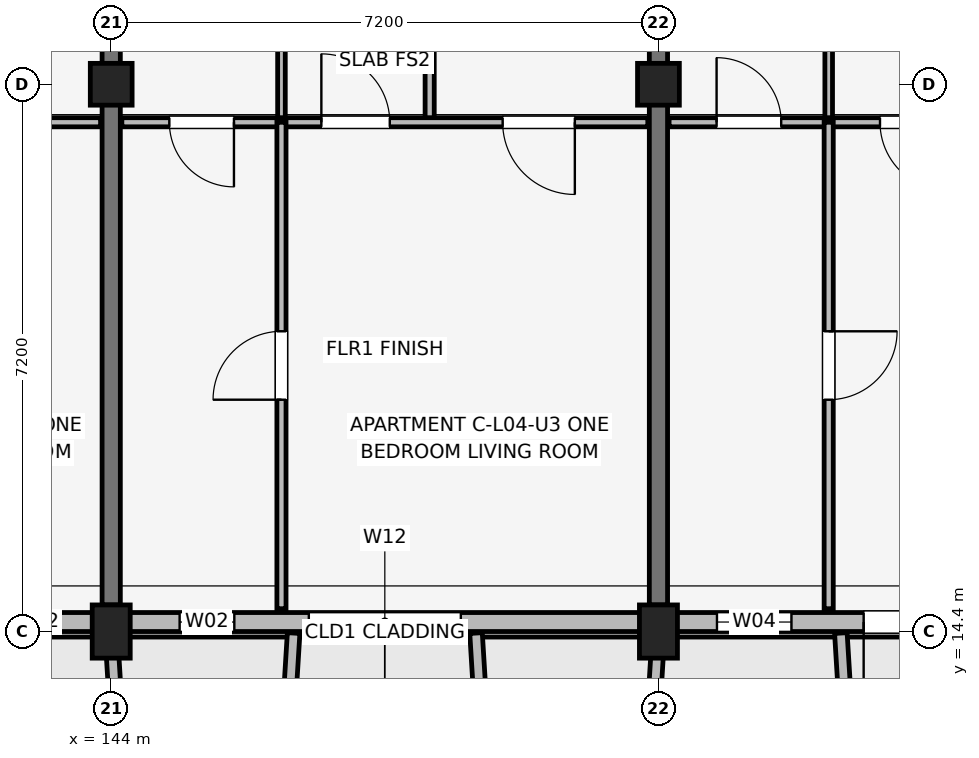
"""IFC4 building model, lengths in metres.
Left out: names, types, materials, properties, quantities, classifications, styles, units other than length and angle.
Written with IfcOpenShell. Run it as: python <this file> out.ifc"""

import sys

from ifc_helpers import new_model, si_unit, direction, frame, frame_2d, origin, origin_2d, place, context, subcontext, project, spatial, rectangle, extrude, element, fill, save


model = new_model("IFC4")
c1 = context("Model", 3, precision=1e-05, world=origin(), true_north=direction((0.0, 1.0)))
c2 = subcontext(c1, "Body", "Model", "MODEL_VIEW")
j1 = project(units=[si_unit("LENGTHUNIT", "METRE"), si_unit("PLANEANGLEUNIT", "RADIAN")], contexts=[c1])
p1 = place(None, origin())
s1 = spatial("IfcSite", under=j1, at=p1, CompositionType="ELEMENT")
p2 = place(p1, origin())
s2 = spatial("IfcBuilding", under=s1, at=p2, CompositionType="ELEMENT")
p3 = place(p2, frame((0.0, 0.0, 15.0)))
s3 = spatial("IfcBuildingStorey", under=s2, at=p3, CompositionType="ELEMENT", Elevation=15.0)
p4 = place(p3, frame((144.0, 14.4, 0.0), z_axis=(0.0, 0.0, 1.0), x_axis=(1.0, 0.0, 0.0)))
e1 = element("IfcColumn", 1, at=p4, inside=s3, PredefinedType="COLUMN", context=c2, shape_type="SweptSolid", body=[
    extrude(rectangle(XDim=0.5, YDim=0.7, at=origin_2d()), origin(), (0.0, 0.0, 1.0), 3.15),
])
p5 = place(p3, frame((144.0, 21.6, 0.0), z_axis=(0.0, 0.0, 1.0), x_axis=(1.0, 0.0, 0.0)))
e2 = element("IfcColumn", 2, at=p5, inside=s3, PredefinedType="COLUMN", context=c2, shape_type="SweptSolid", body=[
    extrude(rectangle(XDim=0.55, YDim=0.55, at=origin_2d()), origin(), (0.0, 0.0, 1.0), 3.15),
])
p6 = place(p3, frame((151.2, 14.4, 0.0), z_axis=(0.0, 0.0, 1.0), x_axis=(1.0, 0.0, 0.0)))
e3 = element("IfcColumn", 3, at=p6, inside=s3, PredefinedType="COLUMN", context=c2, shape_type="SweptSolid", body=[
    extrude(rectangle(XDim=0.5, YDim=0.7, at=origin_2d()), origin(), (0.0, 0.0, 1.0), 3.15),
])
p7 = place(p3, frame((151.2, 21.6, 0.0), z_axis=(0.0, 0.0, 1.0), x_axis=(1.0, 0.0, 0.0)))
e4 = element("IfcColumn", 4, at=p7, inside=s3, PredefinedType="COLUMN", context=c2, shape_type="SweptSolid", body=[
    extrude(rectangle(XDim=0.55, YDim=0.55, at=origin_2d()), origin(), (0.0, 0.0, 1.0), 3.15),
])
for number, where, z_axis, x_axis in (
    (5, (144.0, 14.75, 0.0), (0.0, 0.0, 1.0), (0.0, 1.0, 0.0)),
    (6, (151.2, 14.75, 0.0), (0.0, 0.0, 1.0), (0.0, 1.0, 0.0)),
):
    element("IfcWall", number, at=place(p3, frame(where, z_axis=z_axis, x_axis=x_axis)), inside=s3, PredefinedType="SHEAR", context=c2, shape_type="SweptSolid", body=[
        extrude(rectangle(XDim=9.4, YDim=0.24, at=frame_2d((4.7, 0.0))), origin(), (0.0, 0.0, 1.0), 3.15),
    ])
p8 = place(p3, frame((132.6, 14.525, 0.0), z_axis=(0.0, 0.0, 1.0), x_axis=(1.0, 0.0, 0.0)))
e7 = element("IfcWall", 7, at=p8, inside=s3, PredefinedType="SOLIDWALL", context=c2, shape_type="SweptSolid", body=[
    extrude(rectangle(XDim=30.0, YDim=0.25, at=frame_2d((15.0, 0.0))), origin(), (0.0, 0.0, 1.0), 2.43),
])
p9 = place(p8, frame((8.55, 0.0, 0.0), z_axis=(0.0, 0.0, 1.0), x_axis=(-1.0, 0.0, 0.0)))
e8 = element("IfcOpeningElement", 8, at=p9, cuts=e7, PredefinedType="OPENING", context=c2, shape_type="SweptSolid", body=[
    extrude(rectangle(XDim=1.5, YDim=2.15, at=frame_2d((0.75, 1.075))), frame((0.0, 0.135, 0.0), z_axis=(0.0, -1.0, 0.0), x_axis=(1.0, 0.0, 0.0)), (0.0, 0.0, 1.0), 0.27),
])
p10 = place(p8, frame((23.1, 0.0, 0.0), z_axis=(0.0, 0.0, 1.0), x_axis=(-1.0, 0.0, 0.0)))
e9 = element("IfcOpeningElement", 9, at=p10, cuts=e7, PredefinedType="OPENING", context=c2, shape_type="SweptSolid", body=[
    extrude(rectangle(XDim=1.8, YDim=2.15, at=frame_2d((0.9, 1.075))), frame((0.0, 0.135, 0.0), z_axis=(0.0, -1.0, 0.0), x_axis=(1.0, 0.0, 0.0)), (0.0, 0.0, 1.0), 0.27),
])
p11 = place(p8, frame((2.555, 0.0, 0.75)))
e10 = element("IfcOpeningElement", 10, at=p11, cuts=e7, PredefinedType="OPENING", context=c2, shape_type="SweptSolid", body=[
    extrude(rectangle(XDim=1.22, YDim=1.5, at=frame_2d((0.61, 0.75))), frame((0.0, 0.135, 0.0), z_axis=(0.0, -1.0, 0.0), x_axis=(1.0, 0.0, 0.0)), (0.0, 0.0, 1.0), 0.27),
])
p12 = place(p8, frame((5.035, 0.0, 0.75)))
e11 = element("IfcOpeningElement", 11, at=p12, cuts=e7, PredefinedType="OPENING", context=c2, shape_type="SweptSolid", body=[
    extrude(rectangle(XDim=0.6, YDim=1.25, at=frame_2d((0.3, 0.625))), frame((0.0, 0.135, 0.0), z_axis=(0.0, -1.0, 0.0), x_axis=(1.0, 0.0, 0.0)), (0.0, 0.0, 1.0), 0.27),
])
p13 = place(p8, frame((12.3, 0.0, 0.75)))
e12 = element("IfcOpeningElement", 12, at=p13, cuts=e7, PredefinedType="OPENING", context=c2, shape_type="SweptSolid", body=[
    extrude(rectangle(XDim=0.72, YDim=1.35, at=frame_2d((0.36, 0.675))), frame((0.0, 0.135, 0.0), z_axis=(0.0, -1.0, 0.0), x_axis=(1.0, 0.0, 0.0)), (0.0, 0.0, 1.0), 0.27),
])
p14 = place(p8, frame((14.0, 0.0, 0.67)))
e13 = element("IfcOpeningElement", 13, at=p14, cuts=e7, PredefinedType="OPENING", context=c2, shape_type="SweptSolid", body=[
    extrude(rectangle(XDim=2.0, YDim=1.65, at=frame_2d((1.0, 0.825))), frame((0.0, 0.135, 0.0), z_axis=(0.0, -1.0, 0.0), x_axis=(1.0, 0.0, 0.0)), (0.0, 0.0, 1.0), 0.27),
])
p15 = place(p8, frame((19.37, 0.0, 0.75)))
e14 = element("IfcOpeningElement", 14, at=p15, cuts=e7, PredefinedType="OPENING", context=c2, shape_type="SweptSolid", body=[
    extrude(rectangle(XDim=0.98, YDim=1.45, at=frame_2d((0.49, 0.725))), frame((0.0, 0.135, 0.0), z_axis=(0.0, -1.0, 0.0), x_axis=(1.0, 0.0, 0.0)), (0.0, 0.0, 1.0), 0.27),
])
p16 = place(p8, frame((26.215, 0.0, 0.7)))
e15 = element("IfcOpeningElement", 15, at=p16, cuts=e7, PredefinedType="OPENING", context=c2, shape_type="SweptSolid", body=[
    extrude(rectangle(XDim=1.86, YDim=1.6, at=frame_2d((0.93, 0.8))), frame((0.0, 0.135, 0.0), z_axis=(0.0, -1.0, 0.0), x_axis=(1.0, 0.0, 0.0)), (0.0, 0.0, 1.0), 0.27),
])
p17 = place(p3, frame((144.0, 14.38, 0.0), z_axis=(0.0, 0.0, 1.0), x_axis=(0.061170732449, -0.998127317276, 0.0)))
e16 = element("IfcWall", 16, at=p17, inside=s3, PredefinedType="ELEMENTEDWALL", context=c2, shape_type="SweptSolid", body=[
    extrude(rectangle(XDim=1.964, YDim=0.165, at=frame_2d((0.982, 0.0))), origin(), (0.0, 0.0, 1.0), 2.95),
])
for number, where, z_axis, x_axis in (
    (17, (146.4, 14.38, 0.0), (0.0, 0.0, 1.0), (-0.061, -0.998, 0.0)),
    (18, (148.8, 14.38, 0.0), (0.0, 0.0, 1.0), (0.061, -0.998, 0.0)),
):
    element("IfcWall", number, at=place(p3, frame(where, z_axis=z_axis, x_axis=x_axis)), inside=s3, PredefinedType="ELEMENTEDWALL", context=c2, shape_type="SweptSolid", body=[
        extrude(rectangle(XDim=1.964, YDim=0.165, at=frame_2d((0.982, 0.0))), origin(), (0.0, 0.0, 1.0), 2.58),
    ])
p18 = place(p3, frame((151.2, 14.38, 0.0), z_axis=(0.0, 0.0, 1.0), x_axis=(-0.061046865508, -0.998134900808, 0.0)))
e19 = element("IfcWall", 19, at=p18, inside=s3, PredefinedType="ELEMENTEDWALL", context=c2, shape_type="SweptSolid", body=[
    extrude(rectangle(XDim=1.964, YDim=0.165, at=frame_2d((0.982, 0.0))), origin(), (0.0, 0.0, 1.0), 2.95),
])
p19 = place(p3, frame((153.6, 14.38, 0.0), z_axis=(0.0, 0.0, 1.0), x_axis=(0.061046865508, -0.998134900808, 0.0)))
e20 = element("IfcWall", 20, at=p19, inside=s3, PredefinedType="ELEMENTEDWALL", context=c2, shape_type="SweptSolid", body=[
    extrude(rectangle(XDim=1.964, YDim=0.165, at=frame_2d((0.982, 0.0))), origin(), (0.0, 0.0, 1.0), 2.45),
])
p20 = place(p3, frame((136.94, 21.1, 0.0), z_axis=(0.0, 0.0, 1.0), x_axis=(1.0, 0.0, 0.0)))
e21 = element("IfcWall", 21, at=p20, inside=s3, PredefinedType="PARTITIONING", context=c2, shape_type="SweptSolid", body=[
    extrude(rectangle(XDim=6.92, YDim=0.12, at=frame_2d((3.46, 0.0))), origin(), (0.0, 0.0, 1.0), 2.38),
])
p21 = place(p20, frame((0.5, 0.0, 0.0)))
e22 = element("IfcOpeningElement", 22, at=p21, cuts=e21, PredefinedType="OPENING", context=c2, shape_type="SweptSolid", body=[
    extrude(rectangle(XDim=0.85, YDim=2.08, at=frame_2d((0.425, 1.04))), frame((0.0, 0.07, 0.0), z_axis=(0.0, -1.0, 0.0), x_axis=(1.0, 0.0, 0.0)), (0.0, 0.0, 1.0), 0.14),
])
p22 = place(p20, frame((3.425, 0.0, 0.0), z_axis=(0.0, 0.0, 1.0), x_axis=(-1.0, 0.0, 0.0)))
e23 = element("IfcOpeningElement", 23, at=p22, cuts=e21, PredefinedType="OPENING", context=c2, shape_type="SweptSolid", body=[
    extrude(rectangle(XDim=0.9, YDim=2.08, at=frame_2d((0.45, 1.04))), frame((0.0, 0.07, 0.0), z_axis=(0.0, -1.0, 0.0), x_axis=(1.0, 0.0, 0.0)), (0.0, 0.0, 1.0), 0.14),
])
p23 = place(p20, frame((5.035, 0.0, 0.0)))
e24 = element("IfcOpeningElement", 24, at=p23, cuts=e21, PredefinedType="OPENING", context=c2, shape_type="SweptSolid", body=[
    extrude(rectangle(XDim=0.95, YDim=2.08, at=frame_2d((0.475, 1.04))), frame((0.0, 0.07, 0.0), z_axis=(0.0, -1.0, 0.0), x_axis=(1.0, 0.0, 0.0)), (0.0, 0.0, 1.0), 0.14),
])
p24 = place(p3, frame((146.24, 21.1, 0.0), z_axis=(0.0, 0.0, 1.0), x_axis=(0.0, 1.0, 0.0)))
e25 = element("IfcWall", 25, at=p24, inside=s3, PredefinedType="PARTITIONING", context=c2, shape_type="SweptSolid", body=[
    extrude(rectangle(XDim=3.2, YDim=0.1, at=frame_2d((1.6, 0.0))), origin(), (0.0, 0.0, 1.0), 2.375),
])
p25 = place(p3, frame((148.19, 21.1, 0.0), z_axis=(0.0, 0.0, 1.0), x_axis=(0.0, 1.0, 0.0)))
e26 = element("IfcWall", 26, at=p25, inside=s3, PredefinedType="PARTITIONING", context=c2, shape_type="SweptSolid", body=[
    extrude(rectangle(XDim=3.2, YDim=0.12, at=frame_2d((1.6, 0.0))), origin(), (0.0, 0.0, 1.0), 2.375),
])
p26 = place(p3, frame((144.14, 21.1, 0.0), z_axis=(0.0, 0.0, 1.0), x_axis=(1.0, 0.0, 0.0)))
e27 = element("IfcWall", 27, at=p26, inside=s3, PredefinedType="PARTITIONING", context=c2, shape_type="SweptSolid", body=[
    extrude(rectangle(XDim=6.92, YDim=0.12, at=frame_2d((3.46, 0.0))), origin(), (0.0, 0.0, 1.0), 2.38),
])
p27 = place(p26, frame((1.475, 0.0, 0.0), z_axis=(0.0, 0.0, 1.0), x_axis=(-1.0, 0.0, 0.0)))
e28 = element("IfcOpeningElement", 28, at=p27, cuts=e27, PredefinedType="OPENING", context=c2, shape_type="SweptSolid", body=[
    extrude(rectangle(XDim=0.85, YDim=2.08, at=frame_2d((0.425, 1.04))), frame((0.0, 0.07, 0.0), z_axis=(0.0, -1.0, 0.0), x_axis=(1.0, 0.0, 0.0)), (0.0, 0.0, 1.0), 0.14),
])
p28 = place(p26, frame((2.625, 0.0, 0.0)))
e29 = element("IfcOpeningElement", 29, at=p28, cuts=e27, PredefinedType="OPENING", context=c2, shape_type="SweptSolid", body=[
    extrude(rectangle(XDim=0.9, YDim=2.08, at=frame_2d((0.45, 1.04))), frame((0.0, 0.07, 0.0), z_axis=(0.0, -1.0, 0.0), x_axis=(1.0, 0.0, 0.0)), (0.0, 0.0, 1.0), 0.14),
])
p29 = place(p26, frame((5.96, 0.0, 0.0), z_axis=(0.0, 0.0, 1.0), x_axis=(-1.0, 0.0, 0.0)))
e30 = element("IfcOpeningElement", 30, at=p29, cuts=e27, PredefinedType="OPENING", context=c2, shape_type="SweptSolid", body=[
    extrude(rectangle(XDim=0.95, YDim=2.08, at=frame_2d((0.475, 1.04))), frame((0.0, 0.07, 0.0), z_axis=(0.0, -1.0, 0.0), x_axis=(1.0, 0.0, 0.0)), (0.0, 0.0, 1.0), 0.14),
])
p30 = place(p3, frame((146.24, 14.7, 0.0), z_axis=(0.0, 0.0, 1.0), x_axis=(0.0, 1.0, 0.0)))
e31 = element("IfcWall", 31, at=p30, inside=s3, PredefinedType="PARTITIONING", context=c2, shape_type="SweptSolid", body=[
    extrude(rectangle(XDim=6.4, YDim=0.12, at=frame_2d((3.2, 0.0))), origin(), (0.0, 0.0, 1.0), 2.38),
])
p31 = place(p30, frame((2.75, 0.0, 0.0)))
e32 = element("IfcOpeningElement", 32, at=p31, cuts=e31, PredefinedType="OPENING", context=c2, shape_type="SweptSolid", body=[
    extrude(rectangle(XDim=0.9, YDim=2.08, at=frame_2d((0.45, 1.04))), frame((0.0, 0.07, 0.0), z_axis=(0.0, -1.0, 0.0), x_axis=(1.0, 0.0, 0.0)), (0.0, 0.0, 1.0), 0.14),
])
p32 = place(p3, frame((153.44, 21.1, 0.0), z_axis=(0.0, 0.0, 1.0), x_axis=(0.0, 1.0, 0.0)))
e33 = element("IfcWall", 33, at=p32, inside=s3, PredefinedType="PARTITIONING", context=c2, shape_type="SweptSolid", body=[
    extrude(rectangle(XDim=3.2, YDim=0.1, at=frame_2d((1.6, 0.0))), origin(), (0.0, 0.0, 1.0), 2.375),
])
p33 = place(p3, frame((151.34, 21.1, 0.0), z_axis=(0.0, 0.0, 1.0), x_axis=(1.0, 0.0, 0.0)))
e34 = element("IfcWall", 34, at=p33, inside=s3, PredefinedType="PARTITIONING", context=c2, shape_type="SweptSolid", body=[
    extrude(rectangle(XDim=6.92, YDim=0.12, at=frame_2d((3.46, 0.0))), origin(), (0.0, 0.0, 1.0), 2.38),
])
p34 = place(p33, frame((0.625, 0.0, 0.0)))
e35 = element("IfcOpeningElement", 35, at=p34, cuts=e34, PredefinedType="OPENING", context=c2, shape_type="SweptSolid", body=[
    extrude(rectangle(XDim=0.85, YDim=2.08, at=frame_2d((0.425, 1.04))), frame((0.0, 0.07, 0.0), z_axis=(0.0, -1.0, 0.0), x_axis=(1.0, 0.0, 0.0)), (0.0, 0.0, 1.0), 0.14),
])
p35 = place(p33, frame((3.675, 0.0, 0.0), z_axis=(0.0, 0.0, 1.0), x_axis=(-1.0, 0.0, 0.0)))
e36 = element("IfcOpeningElement", 36, at=p35, cuts=e34, PredefinedType="OPENING", context=c2, shape_type="SweptSolid", body=[
    extrude(rectangle(XDim=0.9, YDim=2.08, at=frame_2d((0.45, 1.04))), frame((0.0, 0.07, 0.0), z_axis=(0.0, -1.0, 0.0), x_axis=(1.0, 0.0, 0.0)), (0.0, 0.0, 1.0), 0.14),
])
p36 = place(p33, frame((5.16, 0.0, 0.0)))
e37 = element("IfcOpeningElement", 37, at=p36, cuts=e34, PredefinedType="OPENING", context=c2, shape_type="SweptSolid", body=[
    extrude(rectangle(XDim=0.95, YDim=2.08, at=frame_2d((0.475, 1.04))), frame((0.0, 0.07, 0.0), z_axis=(0.0, -1.0, 0.0), x_axis=(1.0, 0.0, 0.0)), (0.0, 0.0, 1.0), 0.14),
])
p37 = place(p3, frame((153.44, 14.7, 0.0), z_axis=(0.0, 0.0, 1.0), x_axis=(0.0, 1.0, 0.0)))
e38 = element("IfcWall", 38, at=p37, inside=s3, PredefinedType="PARTITIONING", context=c2, shape_type="SweptSolid", body=[
    extrude(rectangle(XDim=6.4, YDim=0.12, at=frame_2d((3.2, 0.0))), origin(), (0.0, 0.0, 1.0), 2.38),
])
p38 = place(p37, frame((3.65, 0.0, 0.0), z_axis=(0.0, 0.0, 1.0), x_axis=(-1.0, 0.0, 0.0)))
e39 = element("IfcOpeningElement", 39, at=p38, cuts=e38, PredefinedType="OPENING", context=c2, shape_type="SweptSolid", body=[
    extrude(rectangle(XDim=0.9, YDim=2.08, at=frame_2d((0.45, 1.04))), frame((0.0, 0.07, 0.0), z_axis=(0.0, -1.0, 0.0), x_axis=(1.0, 0.0, 0.0)), (0.0, 0.0, 1.0), 0.14),
])
p39 = place(p10, origin())
e40 = element("IfcDoor", 40, at=p39, inside=s3, OperationType="SINGLE_SWING_LEFT", PredefinedType="DOOR", context=c2, shape_type="SweptSolid", body=[
    extrude(rectangle(XDim=1.8, YDim=2.15, at=frame_2d((0.9, 1.075))), frame((0.0, 0.025, 0.0), z_axis=(0.0, -1.0, 0.0), x_axis=(1.0, 0.0, 0.0)), (0.0, 0.0, 1.0), 0.05),
])
fill(e9, e40)
p40 = place(p13, origin())
e41 = element("IfcWindow", 41, at=p40, inside=s3, PartitioningType="SINGLE_PANEL", PredefinedType="WINDOW", context=c2, shape_type="SweptSolid", body=[
    extrude(rectangle(XDim=0.72, YDim=1.35, at=frame_2d((0.36, 0.675))), frame((0.0, 0.03, 0.0), z_axis=(0.0, -1.0, 0.0), x_axis=(1.0, 0.0, 0.0)), (0.0, 0.0, 1.0), 0.06),
])
fill(e12, e41)
p41 = place(p14, origin())
e42 = element("IfcWindow", 42, at=p41, inside=s3, PartitioningType="SINGLE_PANEL", PredefinedType="WINDOW", context=c2, shape_type="SweptSolid", body=[
    extrude(rectangle(XDim=2.0, YDim=1.65, at=frame_2d((1.0, 0.825))), frame((0.0, 0.03, 0.0), z_axis=(0.0, -1.0, 0.0), x_axis=(1.0, 0.0, 0.0)), (0.0, 0.0, 1.0), 0.06),
])
fill(e13, e42)
p42 = place(p15, origin())
e43 = element("IfcWindow", 43, at=p42, inside=s3, PartitioningType="SINGLE_PANEL", PredefinedType="WINDOW", context=c2, shape_type="SweptSolid", body=[
    extrude(rectangle(XDim=0.98, YDim=1.45, at=frame_2d((0.49, 0.725))), frame((0.0, 0.03, 0.0), z_axis=(0.0, -1.0, 0.0), x_axis=(1.0, 0.0, 0.0)), (0.0, 0.0, 1.0), 0.06),
])
fill(e14, e43)
p43 = place(p27, origin())
e44 = element("IfcDoor", 44, at=p43, inside=s3, OperationType="SINGLE_SWING_RIGHT", PredefinedType="DOOR", context=c2, shape_type="SweptSolid", body=[
    extrude(rectangle(XDim=0.85, YDim=2.08, at=frame_2d((0.425, 1.04))), frame((0.0, 0.025, 0.0), z_axis=(0.0, -1.0, 0.0), x_axis=(1.0, 0.0, 0.0)), (0.0, 0.0, 1.0), 0.05),
])
fill(e28, e44)
p44 = place(p28, origin())
e45 = element("IfcDoor", 45, at=p44, inside=s3, OperationType="SINGLE_SWING_LEFT", PredefinedType="DOOR", context=c2, shape_type="SweptSolid", body=[
    extrude(rectangle(XDim=0.9, YDim=2.08, at=frame_2d((0.45, 1.04))), frame((0.0, 0.025, 0.0), z_axis=(0.0, -1.0, 0.0), x_axis=(1.0, 0.0, 0.0)), (0.0, 0.0, 1.0), 0.05),
])
fill(e29, e45)
p45 = place(p29, origin())
e46 = element("IfcDoor", 46, at=p45, inside=s3, OperationType="SINGLE_SWING_RIGHT", PredefinedType="DOOR", context=c2, shape_type="SweptSolid", body=[
    extrude(rectangle(XDim=0.95, YDim=2.08, at=frame_2d((0.475, 1.04))), frame((0.0, 0.025, 0.0), z_axis=(0.0, -1.0, 0.0), x_axis=(1.0, 0.0, 0.0)), (0.0, 0.0, 1.0), 0.05),
])
fill(e30, e46)
p46 = place(p31, origin())
e47 = element("IfcDoor", 47, at=p46, inside=s3, OperationType="SINGLE_SWING_LEFT", PredefinedType="DOOR", context=c2, shape_type="SweptSolid", body=[
    extrude(rectangle(XDim=0.9, YDim=2.08, at=frame_2d((0.45, 1.04))), frame((0.0, 0.025, 0.0), z_axis=(0.0, -1.0, 0.0), x_axis=(1.0, 0.0, 0.0)), (0.0, 0.0, 1.0), 0.05),
])
fill(e32, e47)
p47 = place(p34, origin())
e48 = element("IfcDoor", 48, at=p47, inside=s3, OperationType="SINGLE_SWING_LEFT", PredefinedType="DOOR", context=c2, shape_type="SweptSolid", body=[
    extrude(rectangle(XDim=0.85, YDim=2.08, at=frame_2d((0.425, 1.04))), frame((0.0, 0.025, 0.0), z_axis=(0.0, -1.0, 0.0), x_axis=(1.0, 0.0, 0.0)), (0.0, 0.0, 1.0), 0.05),
])
fill(e35, e48)
p48 = place(p35, origin())
e49 = element("IfcDoor", 49, at=p48, inside=s3, OperationType="SINGLE_SWING_RIGHT", PredefinedType="DOOR", context=c2, shape_type="SweptSolid", body=[
    extrude(rectangle(XDim=0.9, YDim=2.08, at=frame_2d((0.45, 1.04))), frame((0.0, 0.025, 0.0), z_axis=(0.0, -1.0, 0.0), x_axis=(1.0, 0.0, 0.0)), (0.0, 0.0, 1.0), 0.05),
])
fill(e36, e49)
p49 = place(p38, origin())
e50 = element("IfcDoor", 50, at=p49, inside=s3, OperationType="SINGLE_SWING_RIGHT", PredefinedType="DOOR", context=c2, shape_type="SweptSolid", body=[
    extrude(rectangle(XDim=0.9, YDim=2.08, at=frame_2d((0.45, 1.04))), frame((0.0, 0.025, 0.0), z_axis=(0.0, -1.0, 0.0), x_axis=(1.0, 0.0, 0.0)), (0.0, 0.0, 1.0), 0.05),
])
fill(e39, e50)
save(model, sys.argv[1])
